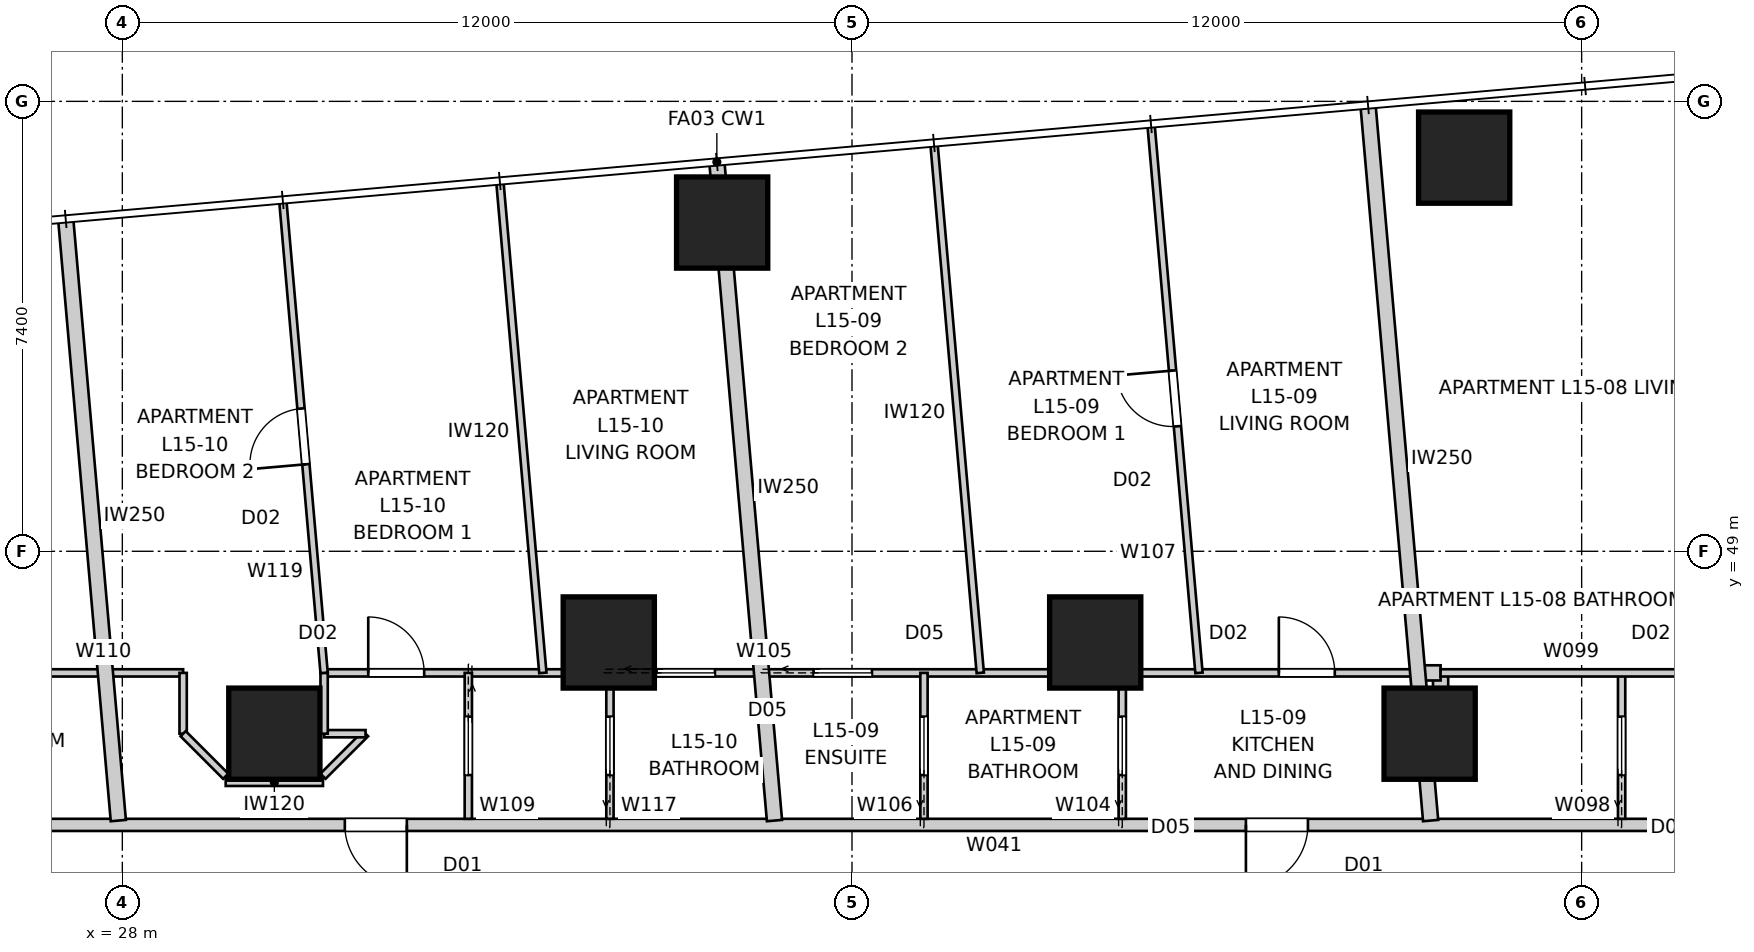
"""IFC4 building model, lengths in metres.
Left out: names, types, materials, properties, quantities, classifications, styles, units other than length and angle.
Written with IfcOpenShell. Run it as: python <this file> out.ifc"""

import sys

from ifc_helpers import new_model, si_unit, direction, frame, frame_2d, origin, origin_2d, place, context, subcontext, project, spatial, rectangle, extrude, element, fill, save


model = new_model("IFC4")
c1 = context("Model", 3, precision=1e-05, world=origin(), true_north=direction((0.0, 1.0)))
c2 = subcontext(c1, "Body", "Model", "MODEL_VIEW")
j1 = project(units=[si_unit("LENGTHUNIT", "METRE"), si_unit("PLANEANGLEUNIT", "RADIAN")], contexts=[c1])
p1 = place(None, origin())
s1 = spatial("IfcSite", under=j1, at=p1, CompositionType="ELEMENT")
p2 = place(p1, origin())
s2 = spatial("IfcBuilding", under=s1, at=p2, CompositionType="ELEMENT")
p3 = place(p2, frame((0.0, 0.0, 57.4)))
s3 = spatial("IfcBuildingStorey", under=s2, at=p3, CompositionType="ELEMENT", Elevation=57.4)
for number, where, z_axis, x_axis in (
    (1, (50.068, 55.474, 0.0), (0.0, 0.0, 1.0), (1.0, 0.0, 0.0)),
    (2, (37.865, 54.407, 0.0), (0.0, 0.0, 1.0), (1.0, 0.0, 0.0)),
    (3, (49.5, 46.0, 0.0), (0.0, 0.0, 1.0), (1.0, 0.0, 0.0)),
    (4, (44.0, 47.5, 0.0), (0.0, 0.0, 1.0), (1.0, 0.0, 0.0)),
    (5, (36.0, 47.5, 0.0), (0.0, 0.0, 1.0), (1.0, 0.0, 0.0)),
    (6, (30.5, 46.0, 0.0), (0.0, 0.0, 1.0), (1.0, 0.0, 0.0)),
):
    element("IfcColumn", number, at=place(p3, frame(where, z_axis=z_axis, x_axis=x_axis)), inside=s3, PredefinedType="COLUMN", context=c2, shape_type="SweptSolid", body=[
        extrude(rectangle(XDim=1.5, YDim=1.5, at=origin_2d()), origin(), (0.0, 0.0, 1.0), 3.4),
    ])
p4 = place(p3, frame((53.7, 44.5, 0.0), z_axis=(0.0, 0.0, 1.0), x_axis=(-1.0, 0.0, 0.0)))
e7 = element("IfcWall", 7, at=p4, inside=s3, PredefinedType="PARTITIONING", context=c2, shape_type="SweptSolid", body=[
    extrude(rectangle(XDim=27.4, YDim=0.2, at=frame_2d((13.7, 0.0))), origin(), (0.0, 0.0, 1.0), 3.25),
])
p5 = place(p4, frame((21.021, 0.0, 0.0)))
e8 = element("IfcOpeningElement", 8, at=p5, cuts=e7, PredefinedType="OPENING", context=c2, shape_type="SweptSolid", body=[
    extrude(rectangle(XDim=1.02, YDim=2.34, at=frame_2d((0.51, 1.17))), frame((0.0, 0.11, 0.0), z_axis=(0.0, -1.0, 0.0), x_axis=(1.0, 0.0, 0.0)), (0.0, 0.0, 1.0), 0.22),
])
p6 = place(p4, frame((6.201, 0.0, 0.0)))
e9 = element("IfcOpeningElement", 9, at=p6, cuts=e7, PredefinedType="OPENING", context=c2, shape_type="SweptSolid", body=[
    extrude(rectangle(XDim=1.02, YDim=2.34, at=frame_2d((0.51, 1.17))), frame((0.0, 0.11, 0.0), z_axis=(0.0, -1.0, 0.0), x_axis=(1.0, 0.0, 0.0)), (0.0, 0.0, 1.0), 0.22),
])
p7 = place(p3, frame((37.778, 55.403, 0.0), z_axis=(0.0, 0.0, 1.0), x_axis=(0.087140211333, -0.996196056792, 0.0)))
e10 = element("IfcWall", 10, at=p7, inside=s3, PredefinedType="PARTITIONING", context=c2, shape_type="SweptSolid", body=[
    extrude(rectangle(XDim=10.873, YDim=0.25, at=frame_2d((5.437, 0.0))), origin(), (0.0, 0.0, 1.0), 3.25),
])
p8 = place(p3, frame((48.487, 56.34, 0.0), z_axis=(0.0, 0.0, 1.0), x_axis=(0.087168232078, -0.996193605338, 0.0)))
e11 = element("IfcWall", 11, at=p8, inside=s3, PredefinedType="PARTITIONING", context=c2, shape_type="SweptSolid", body=[
    extrude(rectangle(XDim=11.814, YDim=0.25, at=frame_2d((5.907, 0.0))), origin(), (0.0, 0.0, 1.0), 3.25),
])
p9 = place(p3, frame((27.068, 54.466, 0.0), z_axis=(0.0, 0.0, 1.0), x_axis=(0.087157803114, -0.996194517831, 0.0)))
e12 = element("IfcWall", 12, at=p9, inside=s3, PredefinedType="PARTITIONING", context=c2, shape_type="SweptSolid", body=[
    extrude(rectangle(XDim=9.933, YDim=0.25, at=frame_2d((4.966, 0.0))), origin(), (0.0, 0.0, 1.0), 3.25),
])
p10 = place(p3, frame((49.68, 47.0, 0.0), z_axis=(0.0, 0.0, 1.0), x_axis=(0.0, -1.0, 0.0)))
e13 = element("IfcWall", 13, at=p10, inside=s3, PredefinedType="PARTITIONING", context=c2, shape_type="SweptSolid", body=[
    extrude(rectangle(XDim=1.549, YDim=0.25, at=frame_2d((0.774, 0.0))), origin(), (0.0, 0.0, 1.0), 3.25),
])
p11 = place(p3, frame((49.328, 47.0, 0.0), z_axis=(0.0, 0.0, 1.0), x_axis=(0.999999759208, -0.000693962359, 0.0)))
e14 = element("IfcWall", 14, at=p11, inside=s3, PredefinedType="PARTITIONING", context=c2, shape_type="SweptSolid", body=[
    extrude(rectangle(XDim=0.352, YDim=0.25, at=frame_2d((0.176, 0.0))), origin(), (0.0, 0.0, 1.0), 3.25),
])
p12 = place(p3, frame((52.657, 44.6, 0.0), z_axis=(0.0, 0.0, 1.0), x_axis=(0.0, 1.0, 0.0)))
e15 = element("IfcWall", 15, at=p12, inside=s3, PredefinedType="PARTITIONING", context=c2, shape_type="SweptSolid", body=[
    extrude(rectangle(XDim=2.4, YDim=0.12, at=frame_2d((1.2, 0.0))), origin(), (0.0, 0.0, 1.0), 3.25),
])
p13 = place(p12, frame((0.72, 0.0, 0.0)))
e16 = element("IfcOpeningElement", 16, at=p13, cuts=e15, PredefinedType="OPENING", context=c2, shape_type="SweptSolid", body=[
    extrude(rectangle(XDim=0.96, YDim=2.1, at=frame_2d((0.48, 1.05))), frame((0.0, 0.07, 0.0), z_axis=(0.0, -1.0, 0.0), x_axis=(1.0, 0.0, 0.0)), (0.0, 0.0, 1.0), 0.14),
])
p14 = place(p3, frame((49.68, 47.0, 0.0), z_axis=(0.0, 0.0, 1.0), x_axis=(1.0, 0.0, 0.0)))
e17 = element("IfcWall", 17, at=p14, inside=s3, PredefinedType="PARTITIONING", context=c2, shape_type="SweptSolid", body=[
    extrude(rectangle(XDim=6.52, YDim=0.12, at=frame_2d((3.26, 0.0))), origin(), (0.0, 0.0, 1.0), 3.25),
])
p15 = place(p14, frame((4.289, 0.0, 0.0)))
e18 = element("IfcOpeningElement", 18, at=p15, cuts=e17, PredefinedType="OPENING", context=c2, shape_type="SweptSolid", body=[
    extrude(rectangle(XDim=0.92, YDim=2.34, at=frame_2d((0.46, 1.17))), frame((0.0, 0.07, 0.0), z_axis=(0.0, -1.0, 0.0), x_axis=(1.0, 0.0, 0.0)), (0.0, 0.0, 1.0), 0.14),
])
p16 = place(p3, frame((44.445, 44.6, 0.0), z_axis=(0.0, 0.0, 1.0), x_axis=(0.0, 1.0, 0.0)))
e19 = element("IfcWall", 19, at=p16, inside=s3, PredefinedType="PARTITIONING", context=c2, shape_type="SweptSolid", body=[
    extrude(rectangle(XDim=2.4, YDim=0.12, at=frame_2d((1.2, 0.0))), origin(), (0.0, 0.0, 1.0), 3.25),
])
p17 = place(p16, frame((0.72, 0.0, 0.0)))
e20 = element("IfcOpeningElement", 20, at=p17, cuts=e19, PredefinedType="OPENING", context=c2, shape_type="SweptSolid", body=[
    extrude(rectangle(XDim=0.96, YDim=2.1, at=frame_2d((0.48, 1.05))), frame((0.0, 0.07, 0.0), z_axis=(0.0, -1.0, 0.0), x_axis=(1.0, 0.0, 0.0)), (0.0, 0.0, 1.0), 0.14),
])
p18 = place(p3, frame((31.319, 47.0, 0.0), z_axis=(0.0, 0.0, 1.0), x_axis=(1.0, 0.0, 0.0)))
e21 = element("IfcWall", 21, at=p18, inside=s3, PredefinedType="PARTITIONING", context=c2, shape_type="SweptSolid", body=[
    extrude(rectangle(XDim=17.985, YDim=0.12, at=frame_2d((8.993, 0.0))), origin(), (0.0, 0.0, 1.0), 2.549),
])
p19 = place(p18, frame((0.726, 0.0, 0.0)))
e22 = element("IfcOpeningElement", 22, at=p19, cuts=e21, PredefinedType="OPENING", context=c2, shape_type="SweptSolid", body=[
    extrude(rectangle(XDim=0.92, YDim=2.34, at=frame_2d((0.46, 1.17))), frame((0.0, 0.07, 0.0), z_axis=(0.0, -1.0, 0.0), x_axis=(1.0, 0.0, 0.0)), (0.0, 0.0, 1.0), 0.14),
])
p20 = place(p18, frame((15.701, 0.0, 0.0)))
e23 = element("IfcOpeningElement", 23, at=p20, cuts=e21, PredefinedType="OPENING", context=c2, shape_type="SweptSolid", body=[
    extrude(rectangle(XDim=0.92, YDim=2.34, at=frame_2d((0.46, 1.17))), frame((0.0, 0.07, 0.0), z_axis=(0.0, -1.0, 0.0), x_axis=(1.0, 0.0, 0.0)), (0.0, 0.0, 1.0), 0.14),
])
p21 = place(p18, frame((5.467, 0.0, 0.0)))
e24 = element("IfcOpeningElement", 24, at=p21, cuts=e21, PredefinedType="OPENING", context=c2, shape_type="SweptSolid", body=[
    extrude(rectangle(XDim=0.96, YDim=2.1, at=frame_2d((0.48, 1.05))), frame((0.0, 0.07, 0.0), z_axis=(0.0, -1.0, 0.0), x_axis=(1.0, 0.0, 0.0)), (0.0, 0.0, 1.0), 0.14),
])
p22 = place(p18, frame((8.05, 0.0, 0.0)))
e25 = element("IfcOpeningElement", 25, at=p22, cuts=e21, PredefinedType="OPENING", context=c2, shape_type="SweptSolid", body=[
    extrude(rectangle(XDim=0.96, YDim=2.1, at=frame_2d((0.48, 1.05))), frame((0.0, 0.07, 0.0), z_axis=(0.0, -1.0, 0.0), x_axis=(1.0, 0.0, 0.0)), (0.0, 0.0, 1.0), 0.14),
])
p23 = place(p3, frame((41.184, 44.6, 0.0), z_axis=(0.0, 0.0, 1.0), x_axis=(0.0, 1.0, 0.0)))
e26 = element("IfcWall", 26, at=p23, inside=s3, PredefinedType="PARTITIONING", context=c2, shape_type="SweptSolid", body=[
    extrude(rectangle(XDim=2.4, YDim=0.12, at=frame_2d((1.2, 0.0))), origin(), (0.0, 0.0, 1.0), 3.25),
])
p24 = place(p23, frame((0.72, 0.0, 0.0)))
e27 = element("IfcOpeningElement", 27, at=p24, cuts=e26, PredefinedType="OPENING", context=c2, shape_type="SweptSolid", body=[
    extrude(rectangle(XDim=0.96, YDim=2.1, at=frame_2d((0.48, 1.05))), frame((0.0, 0.07, 0.0), z_axis=(0.0, -1.0, 0.0), x_axis=(1.0, 0.0, 0.0)), (0.0, 0.0, 1.0), 0.14),
])
p25 = place(p3, frame((45.707, 47.0, 0.0), z_axis=(0.0, 0.0, 1.0), x_axis=(-0.087160907995, 0.996194246178, 0.0)))
e28 = element("IfcWall", 28, at=p25, inside=s3, PredefinedType="PARTITIONING", context=c2, shape_type="SweptSolid", body=[
    extrude(rectangle(XDim=9.022, YDim=0.12, at=frame_2d((4.511, 0.0))), origin(), (0.0, 0.0, 1.0), 3.25),
])
p26 = place(p25, frame((4.071, 0.0, 0.0)))
e29 = element("IfcOpeningElement", 29, at=p26, cuts=e28, PredefinedType="OPENING", context=c2, shape_type="SweptSolid", body=[
    extrude(rectangle(XDim=0.92, YDim=2.34, at=frame_2d((0.46, 1.17))), frame((0.0, 0.07, 0.0), z_axis=(0.0, -1.0, 0.0), x_axis=(1.0, 0.0, 0.0)), (0.0, 0.0, 1.0), 0.14),
])
p27 = place(p3, frame((42.11, 47.0, 0.0), z_axis=(0.0, 0.0, 1.0), x_axis=(-0.087158256162, 0.996194478193, 0.0)))
e30 = element("IfcWall", 30, at=p27, inside=s3, PredefinedType="PARTITIONING", context=c2, shape_type="SweptSolid", body=[
    extrude(rectangle(XDim=8.709, YDim=0.12, at=frame_2d((4.354, 0.0))), origin(), (0.0, 0.0, 1.0), 3.25),
])
p28 = place(p3, frame((33.69, 47.0, 0.0), z_axis=(0.0, 0.0, 1.0), x_axis=(0.0, -1.0, 0.0)))
e31 = element("IfcWall", 31, at=p28, inside=s3, PredefinedType="PARTITIONING", context=c2, shape_type="SweptSolid", body=[
    extrude(rectangle(XDim=2.4, YDim=0.12, at=frame_2d((1.2, 0.0))), origin(), (0.0, 0.0, 1.0), 3.25),
])
p29 = place(p28, frame((0.72, 0.0, 0.0)))
e32 = element("IfcOpeningElement", 32, at=p29, cuts=e31, PredefinedType="OPENING", context=c2, shape_type="SweptSolid", body=[
    extrude(rectangle(XDim=0.96, YDim=2.1, at=frame_2d((0.48, 1.05))), frame((0.0, 0.07, 0.0), z_axis=(0.0, -1.0, 0.0), x_axis=(1.0, 0.0, 0.0)), (0.0, 0.0, 1.0), 0.14),
])
p30 = place(p3, frame((23.8, 47.0, 0.0), z_axis=(0.0, 0.0, 1.0), x_axis=(1.0, 0.0, 0.0)))
e33 = element("IfcWall", 33, at=p30, inside=s3, PredefinedType="PARTITIONING", context=c2, shape_type="SweptSolid", body=[
    extrude(rectangle(XDim=5.2, YDim=0.12, at=frame_2d((2.6, 0.0))), origin(), (0.0, 0.0, 1.0), 3.25),
])
p31 = place(p30, frame((1.618, 0.0, 0.0)))
e34 = element("IfcOpeningElement", 34, at=p31, cuts=e33, PredefinedType="OPENING", context=c2, shape_type="SweptSolid", body=[
    extrude(rectangle(XDim=0.96, YDim=2.1, at=frame_2d((0.48, 1.05))), frame((0.0, 0.07, 0.0), z_axis=(0.0, -1.0, 0.0), x_axis=(1.0, 0.0, 0.0)), (0.0, 0.0, 1.0), 0.14),
])
p32 = place(p3, frame((29.0, 47.0, 0.0), z_axis=(0.0, 0.0, 1.0), x_axis=(0.0, -1.0, 0.0)))
e35 = element("IfcWall", 35, at=p32, inside=s3, PredefinedType="PARTITIONING", context=c2, shape_type="SweptSolid", body=[
    extrude(rectangle(XDim=1.0, YDim=0.12, at=frame_2d((0.5, 0.0))), origin(), (0.0, 0.0, 1.0), 3.25),
])
p33 = place(p3, frame((29.0, 46.0, 0.0), z_axis=(0.0, 0.0, 1.0), x_axis=(0.707106781187, -0.707106781187, 0.0)))
e36 = element("IfcWall", 36, at=p33, inside=s3, PredefinedType="PARTITIONING", context=c2, shape_type="SweptSolid", body=[
    extrude(rectangle(XDim=0.99, YDim=0.12, at=frame_2d((0.495, 0.0))), origin(), (0.0, 0.0, 1.0), 3.25),
])
p34 = place(p3, frame((29.7, 45.2, 0.0), z_axis=(0.0, 0.0, 1.0), x_axis=(1.0, 0.0, 0.0)))
e37 = element("IfcWall", 37, at=p34, inside=s3, PredefinedType="PARTITIONING", context=c2, shape_type="SweptSolid", body=[
    extrude(rectangle(XDim=1.6, YDim=0.12, at=frame_2d((0.8, 0.0))), origin(), (0.0, 0.0, 1.0), 3.25),
])
p35 = place(p3, frame((31.3, 45.3, 0.0), z_axis=(0.0, 0.0, 1.0), x_axis=(0.707106781187, 0.707106781187, 0.0)))
e38 = element("IfcWall", 38, at=p35, inside=s3, PredefinedType="PARTITIONING", context=c2, shape_type="SweptSolid", body=[
    extrude(rectangle(XDim=0.99, YDim=0.12, at=frame_2d((0.495, 0.0))), origin(), (0.0, 0.0, 1.0), 3.25),
])
p36 = place(p3, frame((32.0, 46.0, 0.0), z_axis=(0.0, 0.0, 1.0), x_axis=(-1.0, 0.0, 0.0)))
e39 = element("IfcWall", 39, at=p36, inside=s3, PredefinedType="PARTITIONING", context=c2, shape_type="SweptSolid", body=[
    extrude(rectangle(XDim=0.681, YDim=0.12, at=frame_2d((0.341, 0.0))), origin(), (0.0, 0.0, 1.0), 3.25),
])
p37 = place(p3, frame((31.319, 46.0, 0.0), z_axis=(0.0, 0.0, 1.0), x_axis=(0.0, 1.0, 0.0)))
e40 = element("IfcWall", 40, at=p37, inside=s3, PredefinedType="PARTITIONING", context=c2, shape_type="SweptSolid", body=[
    extrude(rectangle(XDim=1.0, YDim=0.12, at=frame_2d((0.5, 0.0))), origin(), (0.0, 0.0, 1.0), 3.25),
])
p38 = place(p3, frame((36.019, 44.6, 0.0), z_axis=(0.0, 0.0, 1.0), x_axis=(0.0, 1.0, 0.0)))
e41 = element("IfcWall", 41, at=p38, inside=s3, PredefinedType="PARTITIONING", context=c2, shape_type="SweptSolid", body=[
    extrude(rectangle(XDim=2.4, YDim=0.12, at=frame_2d((1.2, 0.0))), origin(), (0.0, 0.0, 1.0), 3.25),
])
p39 = place(p38, frame((0.72, 0.0, 0.0)))
e42 = element("IfcOpeningElement", 42, at=p39, cuts=e41, PredefinedType="OPENING", context=c2, shape_type="SweptSolid", body=[
    extrude(rectangle(XDim=0.96, YDim=2.1, at=frame_2d((0.48, 1.05))), frame((0.0, 0.07, 0.0), z_axis=(0.0, -1.0, 0.0), x_axis=(1.0, 0.0, 0.0)), (0.0, 0.0, 1.0), 0.14),
])
p40 = place(p3, frame((34.916, 47.0, 0.0), z_axis=(0.0, 0.0, 1.0), x_axis=(-0.087184938313, 0.99619214338, 0.0)))
e43 = element("IfcWall", 43, at=p40, inside=s3, PredefinedType="PARTITIONING", context=c2, shape_type="SweptSolid", body=[
    extrude(rectangle(XDim=8.082, YDim=0.12, at=frame_2d((4.041, 0.0))), origin(), (0.0, 0.0, 1.0), 3.25),
])
p41 = place(p3, frame((31.319, 47.0, 0.0), z_axis=(0.0, 0.0, 1.0), x_axis=(-0.0871517452, 0.996195047824, 0.0)))
e44 = element("IfcWall", 44, at=p41, inside=s3, PredefinedType="PARTITIONING", context=c2, shape_type="SweptSolid", body=[
    extrude(rectangle(XDim=7.768, YDim=0.12, at=frame_2d((3.884, 0.0))), origin(), (0.0, 0.0, 1.0), 3.25),
])
p42 = place(p41, frame((3.444, 0.0, 0.0)))
e45 = element("IfcOpeningElement", 45, at=p42, cuts=e44, PredefinedType="OPENING", context=c2, shape_type="SweptSolid", body=[
    extrude(rectangle(XDim=0.92, YDim=2.34, at=frame_2d((0.46, 1.17))), frame((0.0, 0.07, 0.0), z_axis=(0.0, -1.0, 0.0), x_axis=(1.0, 0.0, 0.0)), (0.0, 0.0, 1.0), 0.14),
])
p43 = place(p5, origin())
e46 = element("IfcDoor", 46, at=p43, inside=s3, OperationType="SINGLE_SWING_LEFT", PredefinedType="DOOR", context=c2, shape_type="SweptSolid", body=[
    extrude(rectangle(XDim=1.02, YDim=2.34, at=frame_2d((0.51, 1.17))), frame((0.0, 0.025, 0.0), z_axis=(0.0, -1.0, 0.0), x_axis=(1.0, 0.0, 0.0)), (0.0, 0.0, 1.0), 0.05),
])
fill(e8, e46)
p44 = place(p6, origin())
e47 = element("IfcDoor", 47, at=p44, inside=s3, OperationType="SINGLE_SWING_RIGHT", PredefinedType="DOOR", context=c2, shape_type="SweptSolid", body=[
    extrude(rectangle(XDim=1.02, YDim=2.34, at=frame_2d((0.51, 1.17))), frame((0.0, 0.025, 0.0), z_axis=(0.0, -1.0, 0.0), x_axis=(1.0, 0.0, 0.0)), (0.0, 0.0, 1.0), 0.05),
])
fill(e9, e47)
p45 = place(p29, origin())
e48 = element("IfcDoor", 48, at=p45, inside=s3, OperationType="SLIDING_TO_LEFT", PredefinedType="DOOR", context=c2, shape_type="SweptSolid", body=[
    extrude(rectangle(XDim=0.96, YDim=2.1, at=frame_2d((0.48, 1.05))), frame((0.0, 0.025, 0.0), z_axis=(0.0, -1.0, 0.0), x_axis=(1.0, 0.0, 0.0)), (0.0, 0.0, 1.0), 0.05),
])
fill(e32, e48)
p46 = place(p19, origin())
e49 = element("IfcDoor", 49, at=p46, inside=s3, OperationType="SINGLE_SWING_LEFT", PredefinedType="DOOR", context=c2, shape_type="SweptSolid", body=[
    extrude(rectangle(XDim=0.92, YDim=2.34, at=frame_2d((0.46, 1.17))), frame((0.0, 0.025, 0.0), z_axis=(0.0, -1.0, 0.0), x_axis=(1.0, 0.0, 0.0)), (0.0, 0.0, 1.0), 0.05),
])
fill(e22, e49)
p47 = place(p20, origin())
e50 = element("IfcDoor", 50, at=p47, inside=s3, OperationType="SINGLE_SWING_LEFT", PredefinedType="DOOR", context=c2, shape_type="SweptSolid", body=[
    extrude(rectangle(XDim=0.92, YDim=2.34, at=frame_2d((0.46, 1.17))), frame((0.0, 0.025, 0.0), z_axis=(0.0, -1.0, 0.0), x_axis=(1.0, 0.0, 0.0)), (0.0, 0.0, 1.0), 0.05),
])
fill(e23, e50)
p48 = place(p17, origin())
e51 = element("IfcDoor", 51, at=p48, inside=s3, OperationType="SLIDING_TO_LEFT", PredefinedType="DOOR", context=c2, shape_type="SweptSolid", body=[
    extrude(rectangle(XDim=0.96, YDim=2.1, at=frame_2d((0.48, 1.05))), frame((0.0, 0.025, 0.0), z_axis=(0.0, -1.0, 0.0), x_axis=(1.0, 0.0, 0.0)), (0.0, 0.0, 1.0), 0.05),
])
fill(e20, e51)
p49 = place(p13, origin())
e52 = element("IfcDoor", 52, at=p49, inside=s3, OperationType="SLIDING_TO_LEFT", PredefinedType="DOOR", context=c2, shape_type="SweptSolid", body=[
    extrude(rectangle(XDim=0.96, YDim=2.1, at=frame_2d((0.48, 1.05))), frame((0.0, 0.025, 0.0), z_axis=(0.0, -1.0, 0.0), x_axis=(1.0, 0.0, 0.0)), (0.0, 0.0, 1.0), 0.05),
])
fill(e16, e52)
p50 = place(p39, origin())
e53 = element("IfcDoor", 53, at=p50, inside=s3, OperationType="SLIDING_TO_LEFT", PredefinedType="DOOR", context=c2, shape_type="SweptSolid", body=[
    extrude(rectangle(XDim=0.96, YDim=2.1, at=frame_2d((0.48, 1.05))), frame((0.0, 0.025, 0.0), z_axis=(0.0, -1.0, 0.0), x_axis=(1.0, 0.0, 0.0)), (0.0, 0.0, 1.0), 0.05),
])
fill(e42, e53)
p51 = place(p26, origin())
e54 = element("IfcDoor", 54, at=p51, inside=s3, OperationType="SINGLE_SWING_RIGHT", PredefinedType="DOOR", context=c2, shape_type="SweptSolid", body=[
    extrude(rectangle(XDim=0.92, YDim=2.34, at=frame_2d((0.46, 1.17))), frame((0.0, 0.025, 0.0), z_axis=(0.0, -1.0, 0.0), x_axis=(1.0, 0.0, 0.0)), (0.0, 0.0, 1.0), 0.05),
])
fill(e29, e54)
p52 = place(p24, origin())
e55 = element("IfcDoor", 55, at=p52, inside=s3, OperationType="SLIDING_TO_LEFT", PredefinedType="DOOR", context=c2, shape_type="SweptSolid", body=[
    extrude(rectangle(XDim=0.96, YDim=2.1, at=frame_2d((0.48, 1.05))), frame((0.0, 0.025, 0.0), z_axis=(0.0, -1.0, 0.0), x_axis=(1.0, 0.0, 0.0)), (0.0, 0.0, 1.0), 0.05),
])
fill(e27, e55)
p53 = place(p21, origin())
e56 = element("IfcDoor", 56, at=p53, inside=s3, OperationType="SLIDING_TO_LEFT", PredefinedType="DOOR", context=c2, shape_type="SweptSolid", body=[
    extrude(rectangle(XDim=0.96, YDim=2.1, at=frame_2d((0.48, 1.05))), frame((0.0, 0.025, 0.0), z_axis=(0.0, -1.0, 0.0), x_axis=(1.0, 0.0, 0.0)), (0.0, 0.0, 1.0), 0.05),
])
fill(e24, e56)
p54 = place(p22, origin())
e57 = element("IfcDoor", 57, at=p54, inside=s3, OperationType="SLIDING_TO_LEFT", PredefinedType="DOOR", context=c2, shape_type="SweptSolid", body=[
    extrude(rectangle(XDim=0.96, YDim=2.1, at=frame_2d((0.48, 1.05))), frame((0.0, 0.025, 0.0), z_axis=(0.0, -1.0, 0.0), x_axis=(1.0, 0.0, 0.0)), (0.0, 0.0, 1.0), 0.05),
])
fill(e25, e57)
p55 = place(p42, origin())
e58 = element("IfcDoor", 58, at=p55, inside=s3, OperationType="SINGLE_SWING_LEFT", PredefinedType="DOOR", context=c2, shape_type="SweptSolid", body=[
    extrude(rectangle(XDim=0.92, YDim=2.34, at=frame_2d((0.46, 1.17))), frame((0.0, 0.025, 0.0), z_axis=(0.0, -1.0, 0.0), x_axis=(1.0, 0.0, 0.0)), (0.0, 0.0, 1.0), 0.05),
])
fill(e45, e58)
save(model, sys.argv[1])
